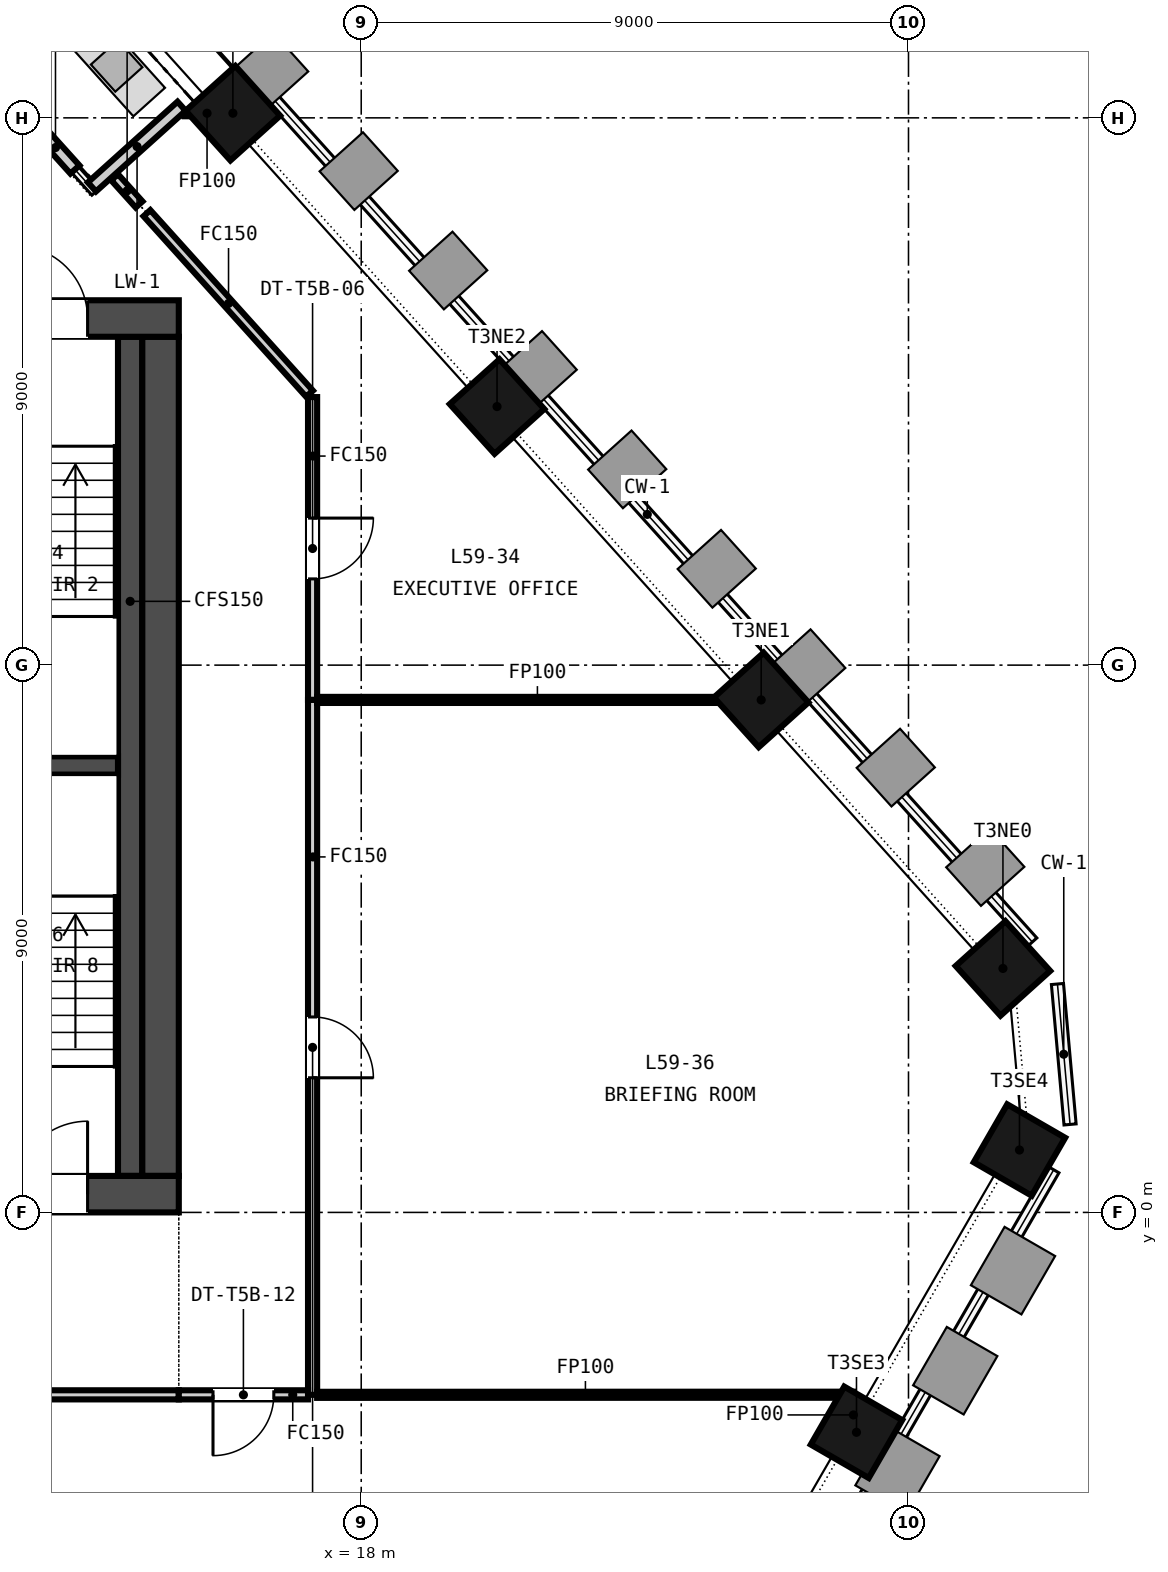
"""IFC4 building model, lengths in metres.
Left out: names, types, materials, properties, quantities, classifications, styles, units other than length and angle.
Written with IfcOpenShell. Run it as: python <this file> out.ifc"""

import sys

from ifc_helpers import new_model, si_unit, direction, frame, frame_2d, origin, origin_2d, place, context, subcontext, project, spatial, rectangle, extrude, element, fill, save


model = new_model("IFC4")
c1 = context("Model", 3, precision=1e-05, world=origin(), true_north=direction((0.0, 1.0)))
c2 = subcontext(c1, "Body", "Model", "MODEL_VIEW")
j1 = project(units=[si_unit("LENGTHUNIT", "METRE"), si_unit("PLANEANGLEUNIT", "RADIAN")], contexts=[c1])
p1 = place(None, origin())
s1 = spatial("IfcSite", under=j1, at=p1, CompositionType="ELEMENT")
p2 = place(p1, origin())
s2 = spatial("IfcBuilding", under=s1, at=p2, CompositionType="ELEMENT")
p3 = place(p2, frame((0.0, 0.0, 234.55)))
s3 = spatial("IfcBuildingStorey", under=s2, at=p3, CompositionType="ELEMENT", Elevation=234.55)
p4 = place(p3, frame((-15.0, 0.3, -0.15), z_axis=(0.0, 0.0, 1.0), x_axis=(1.0, 0.0, 0.0)))
e1 = element("IfcWall", 1, at=p4, inside=s3, PredefinedType="SOLIDWALL", context=c2, shape_type="SweptSolid", body=[
    extrude(rectangle(XDim=30.0, YDim=0.6, at=frame_2d((15.0, 0.0))), origin(), (0.0, 0.0, 1.0), 3.65),
])
p5 = place(p4, frame((5.8, 0.0, 0.15)))
e2 = element("IfcOpeningElement", 2, at=p5, cuts=e1, PredefinedType="OPENING", context=c2, shape_type="SweptSolid", body=[
    extrude(rectangle(XDim=2.4, YDim=2.4, at=frame_2d((1.2, 1.2))), frame((0.0, 0.31, 0.0), z_axis=(0.0, -1.0, 0.0), x_axis=(1.0, 0.0, 0.0)), (0.0, 0.0, 1.0), 0.62),
])
p6 = place(p4, frame((13.8, 0.0, 0.15)))
e3 = element("IfcOpeningElement", 3, at=p6, cuts=e1, PredefinedType="OPENING", context=c2, shape_type="SweptSolid", body=[
    extrude(rectangle(XDim=2.4, YDim=2.4, at=frame_2d((1.2, 1.2))), frame((0.0, 0.31, 0.0), z_axis=(0.0, -1.0, 0.0), x_axis=(1.0, 0.0, 0.0)), (0.0, 0.0, 1.0), 0.62),
])
p7 = place(p4, frame((21.8, 0.0, 0.15)))
e4 = element("IfcOpeningElement", 4, at=p7, cuts=e1, PredefinedType="OPENING", context=c2, shape_type="SweptSolid", body=[
    extrude(rectangle(XDim=2.4, YDim=2.4, at=frame_2d((1.2, 1.2))), frame((0.0, 0.31, 0.0), z_axis=(0.0, -1.0, 0.0), x_axis=(1.0, 0.0, 0.0)), (0.0, 0.0, 1.0), 0.62),
])
p8 = place(p4, frame((1.5, 0.0, 0.15)))
e5 = element("IfcOpeningElement", 5, at=p8, cuts=e1, PredefinedType="OPENING", context=c2, shape_type="SweptSolid", body=[
    extrude(rectangle(XDim=1.2, YDim=2.1, at=frame_2d((0.6, 1.05))), frame((0.0, 0.31, 0.0), z_axis=(0.0, -1.0, 0.0), x_axis=(1.0, 0.0, 0.0)), (0.0, 0.0, 1.0), 0.62),
])
p9 = place(p4, frame((27.3, 0.0, 0.15)))
e6 = element("IfcOpeningElement", 6, at=p9, cuts=e1, PredefinedType="OPENING", context=c2, shape_type="SweptSolid", body=[
    extrude(rectangle(XDim=1.2, YDim=2.1, at=frame_2d((0.6, 1.05))), frame((0.0, 0.31, 0.0), z_axis=(0.0, -1.0, 0.0), x_axis=(1.0, 0.0, 0.0)), (0.0, 0.0, 1.0), 0.62),
])
p10 = place(p3, frame((-15.0, 14.7, -0.15), z_axis=(0.0, 0.0, 1.0), x_axis=(1.0, 0.0, 0.0)))
e7 = element("IfcWall", 7, at=p10, inside=s3, PredefinedType="SOLIDWALL", context=c2, shape_type="SweptSolid", body=[
    extrude(rectangle(XDim=30.0, YDim=0.6, at=frame_2d((15.0, 0.0))), origin(), (0.0, 0.0, 1.0), 3.65),
])
p11 = place(p10, frame((9.25, 0.0, 0.15)))
e8 = element("IfcOpeningElement", 8, at=p11, cuts=e7, PredefinedType="OPENING", context=c2, shape_type="SweptSolid", body=[
    extrude(rectangle(XDim=1.5, YDim=2.1, at=frame_2d((0.75, 1.05))), frame((0.0, 0.31, 0.0), z_axis=(0.0, -1.0, 0.0), x_axis=(1.0, 0.0, 0.0)), (0.0, 0.0, 1.0), 0.62),
])
p12 = place(p10, frame((19.4, 0.0, 0.15)))
e9 = element("IfcOpeningElement", 9, at=p12, cuts=e7, PredefinedType="OPENING", context=c2, shape_type="SweptSolid", body=[
    extrude(rectangle(XDim=1.5, YDim=2.1, at=frame_2d((0.75, 1.05))), frame((0.0, 0.31, 0.0), z_axis=(0.0, -1.0, 0.0), x_axis=(1.0, 0.0, 0.0)), (0.0, 0.0, 1.0), 0.62),
])
p13 = place(p10, frame((1.5, 0.0, 0.15)))
e10 = element("IfcOpeningElement", 10, at=p13, cuts=e7, PredefinedType="OPENING", context=c2, shape_type="SweptSolid", body=[
    extrude(rectangle(XDim=1.2, YDim=2.1, at=frame_2d((0.6, 1.05))), frame((0.0, 0.31, 0.0), z_axis=(0.0, -1.0, 0.0), x_axis=(1.0, 0.0, 0.0)), (0.0, 0.0, 1.0), 0.62),
])
p14 = place(p10, frame((27.3, 0.0, 0.15)))
e11 = element("IfcOpeningElement", 11, at=p14, cuts=e7, PredefinedType="OPENING", context=c2, shape_type="SweptSolid", body=[
    extrude(rectangle(XDim=1.2, YDim=2.1, at=frame_2d((0.6, 1.05))), frame((0.0, 0.31, 0.0), z_axis=(0.0, -1.0, 0.0), x_axis=(1.0, 0.0, 0.0)), (0.0, 0.0, 1.0), 0.62),
])
p15 = place(p3, frame((14.7, 0.6, -0.15), z_axis=(0.0, 0.0, 1.0), x_axis=(0.0, 1.0, 0.0)))
e12 = element("IfcWall", 12, at=p15, inside=s3, PredefinedType="SOLIDWALL", context=c2, shape_type="SweptSolid", body=[
    extrude(rectangle(XDim=13.8, YDim=0.6, at=frame_2d((6.9, 0.0))), origin(), (0.0, 0.0, 1.0), 3.65),
])
for number, where, z_axis, x_axis in (
    (13, (26.145, -3.616, -0.15), (0.0, 0.0, 1.0), (0.5, 0.866, 0.0)),
    (14, (28.825, 1.026, -0.15), (0.0, 0.0, 1.0), (0.5, 0.866, 0.0)),
    (15, (28.553, 4.012, -0.15), (0.0, 0.0, 1.0), (-0.669, 0.743, 0.0)),
    (16, (24.577, 8.427, -0.15), (0.0, 0.0, 1.0), (-0.669, 0.743, 0.0)),
    (17, (20.233, 13.252, -0.15), (0.0, 0.0, 1.0), (-0.669, 0.743, 0.0)),
    (18, (15.89, 18.076, -0.15), (0.0, 0.0, 1.0), (-0.669, 0.743, 0.0)),
):
    element("IfcColumn", number, at=place(p3, frame(where, z_axis=z_axis, x_axis=x_axis)), inside=s3, PredefinedType="COLUMN", context=c2, shape_type="SweptSolid", body=[
        extrude(rectangle(XDim=1.1, YDim=1.1, at=origin_2d()), origin(), (0.0, 0.0, 1.0), 3.65),
    ])
p16 = place(p3, frame((13.292, 17.15, 0.0), z_axis=(0.0, 0.0, 1.0), x_axis=(-0.66915429884, 0.743123491988, 0.0)))
e19 = element("IfcWall", 19, at=p16, inside=s3, PredefinedType="SOLIDWALL", context=c2, shape_type="SweptSolid", body=[
    extrude(rectangle(XDim=3.842, YDim=0.2, at=frame_2d((1.921, 0.0))), origin(), (0.0, 0.0, 1.0), 3.05),
])
p17 = place(p16, frame((1.021, 0.0, 0.0)))
e20 = element("IfcOpeningElement", 20, at=p17, cuts=e19, PredefinedType="OPENING", context=c2, shape_type="SweptSolid", body=[
    extrude(rectangle(XDim=1.8, YDim=2.4, at=frame_2d((0.9, 1.2))), frame((0.0, 0.11, 0.0), z_axis=(0.0, -1.0, 0.0), x_axis=(1.0, 0.0, 0.0)), (0.0, 0.0, 1.0), 0.22),
])
p18 = place(p3, frame((15.046, 18.191, 0.0), z_axis=(0.0, 0.0, 1.0), x_axis=(-0.743116679126, -0.669161864727, 0.0)))
e21 = element("IfcWall", 21, at=p18, inside=s3, PredefinedType="SOLIDWALL", context=c2, shape_type="SweptSolid", body=[
    extrude(rectangle(XDim=1.984, YDim=0.2, at=frame_2d((0.992, 0.0))), origin(), (0.0, 0.0, 1.0), 3.05),
])
p19 = place(p3, frame((11.05, 7.35, 0.0), z_axis=(0.0, 0.0, 1.0), x_axis=(1.0, 0.0, 0.0)))
e22 = element("IfcWall", 22, at=p19, inside=s3, PredefinedType="SOLIDWALL", context=c2, shape_type="SweptSolid", body=[
    extrude(rectangle(XDim=2.95, YDim=0.3, at=frame_2d((1.475, 0.0))), origin(), (0.0, 0.0, 1.0), 3.5),
])
p20 = place(p3, frame((14.2, 0.6, 0.0), z_axis=(0.0, 0.0, 1.0), x_axis=(0.0, 1.0, 0.0)))
e23 = element("IfcWall", 23, at=p20, inside=s3, PredefinedType="SOLIDWALL", context=c2, shape_type="SweptSolid", body=[
    extrude(rectangle(XDim=13.8, YDim=0.4, at=frame_2d((6.9, 0.0))), origin(), (0.0, 0.0, 1.0), 3.5),
])
p21 = place(p3, frame((15.0, -3.0, 0.0), z_axis=(0.0, 0.0, 1.0), x_axis=(-1.0, 0.0, 0.0)))
e24 = element("IfcWall", 24, at=p21, inside=s3, PredefinedType="PARTITIONING", context=c2, shape_type="SweptSolid", body=[
    extrude(rectangle(XDim=27.904, YDim=0.15, at=frame_2d((13.952, 0.0))), origin(), (0.0, 0.0, 1.0), 2.751),
])
p22 = place(p21, frame((13.052, 0.0, 0.0)))
e25 = element("IfcOpeningElement", 25, at=p22, cuts=e24, PredefinedType="OPENING", context=c2, shape_type="SweptSolid", body=[
    extrude(rectangle(XDim=1.8, YDim=2.1, at=frame_2d((0.9, 1.05))), frame((0.0, 0.085, 0.0), z_axis=(0.0, -1.0, 0.0), x_axis=(1.0, 0.0, 0.0)), (0.0, 0.0, 1.0), 0.17),
])
p23 = place(p3, frame((17.2, 13.408, 0.0), z_axis=(0.0, 0.0, 1.0), x_axis=(0.0, -1.0, 0.0)))
e26 = element("IfcWall", 26, at=p23, inside=s3, PredefinedType="PARTITIONING", context=c2, shape_type="SweptSolid", body=[
    extrude(rectangle(XDim=4.98, YDim=0.15, at=frame_2d((2.49, 0.0))), origin(), (0.0, 0.0, 1.0), 2.751),
])
p24 = place(p23, frame((1.99, 0.0, 0.0)))
e27 = element("IfcOpeningElement", 27, at=p24, cuts=e26, PredefinedType="OPENING", context=c2, shape_type="SweptSolid", body=[
    extrude(rectangle(XDim=1.0, YDim=2.1, at=frame_2d((0.5, 1.05))), frame((0.0, 0.085, 0.0), z_axis=(0.0, -1.0, 0.0), x_axis=(1.0, 0.0, 0.0)), (0.0, 0.0, 1.0), 0.17),
])
p25 = place(p3, frame((17.2, 8.428, 0.0), z_axis=(0.0, 0.0, 1.0), x_axis=(0.0, -1.0, 0.0)))
e28 = element("IfcWall", 28, at=p25, inside=s3, PredefinedType="PARTITIONING", context=c2, shape_type="SweptSolid", body=[
    extrude(rectangle(XDim=11.428, YDim=0.15, at=frame_2d((5.714, 0.0))), origin(), (0.0, 0.0, 1.0), 2.751),
])
p26 = place(p25, frame((5.214, 0.0, 0.0)))
e29 = element("IfcOpeningElement", 29, at=p26, cuts=e28, PredefinedType="OPENING", context=c2, shape_type="SweptSolid", body=[
    extrude(rectangle(XDim=1.0, YDim=2.1, at=frame_2d((0.5, 1.05))), frame((0.0, 0.085, 0.0), z_axis=(0.0, -1.0, 0.0), x_axis=(1.0, 0.0, 0.0)), (0.0, 0.0, 1.0), 0.17),
])
p27 = place(p3, frame((17.125, -3.0, 0.0), z_axis=(0.0, 0.0, 1.0), x_axis=(-1.0, 0.0, 0.0)))
e30 = element("IfcWall", 30, at=p27, inside=s3, PredefinedType="PARTITIONING", context=c2, shape_type="SweptSolid", body=[
    extrude(rectangle(XDim=2.125, YDim=0.15, at=frame_2d((1.062, 0.0))), origin(), (0.0, 0.0, 1.0), 2.751),
])
p28 = place(p27, frame((0.562, 0.0, 0.0)))
e31 = element("IfcOpeningElement", 31, at=p28, cuts=e30, PredefinedType="OPENING", context=c2, shape_type="SweptSolid", body=[
    extrude(rectangle(XDim=1.0, YDim=2.1, at=frame_2d((0.5, 1.05))), frame((0.0, 0.085, 0.0), z_axis=(0.0, -1.0, 0.0), x_axis=(1.0, 0.0, 0.0)), (0.0, 0.0, 1.0), 0.17),
])
p29 = place(p3, frame((15.097, 18.076, 0.0), z_axis=(0.0, 0.0, 1.0), x_axis=(1.0, 0.0, 0.0)))
e32 = element("IfcWall", 32, at=p29, inside=s3, PredefinedType="PARTITIONING", context=c2, shape_type="SweptSolid", body=[
    extrude(rectangle(XDim=0.725, YDim=0.1, at=frame_2d((0.362, 0.0))), origin(), (0.0, 0.0, 1.0), 2.751),
])
p30 = place(p3, frame((13.944, 17.024, 0.0), z_axis=(0.0, 0.0, 1.0), x_axis=(0.669076605274, -0.74319344472, 0.0)))
e33 = element("IfcWall", 33, at=p30, inside=s3, PredefinedType="PARTITIONING", context=c2, shape_type="SweptSolid", body=[
    extrude(rectangle(XDim=0.603, YDim=0.15, at=frame_2d((0.301, 0.0))), origin(), (0.0, 0.0, 1.0), 2.751),
])
p31 = place(p3, frame((14.476, 16.433, 0.0), z_axis=(0.0, 0.0, 1.0), x_axis=(0.669204384193, -0.743078388985, 0.0)))
e34 = element("IfcWall", 34, at=p31, inside=s3, PredefinedType="PARTITIONING", context=c2, shape_type="SweptSolid", body=[
    extrude(rectangle(XDim=3.996, YDim=0.15, at=frame_2d((1.998, 0.0))), origin(), (0.0, 0.0, 1.0), 2.751),
])
p32 = place(p3, frame((17.275, 8.428, 0.0), z_axis=(0.0, 0.0, 1.0), x_axis=(1.0, 0.0, 0.0)))
e35 = element("IfcWall", 35, at=p32, inside=s3, PredefinedType="PARTITIONING", context=c2, shape_type="SweptSolid", body=[
    extrude(rectangle(XDim=7.235, YDim=0.1, at=frame_2d((3.618, 0.0))), origin(), (0.0, 0.0, 1.0), 2.751),
])
p33 = place(p3, frame((17.275, -3.0, 0.0), z_axis=(0.0, 0.0, 1.0), x_axis=(0.999999975449, 0.000221588228, 0.0)))
e36 = element("IfcWall", 36, at=p33, inside=s3, PredefinedType="PARTITIONING", context=c2, shape_type="SweptSolid", body=[
    extrude(rectangle(XDim=8.814, YDim=0.1, at=frame_2d((4.407, 0.0))), origin(), (0.0, 0.0, 1.0), 2.751),
])
p34 = place(p3, frame((26.089, -3.613, 0.0), z_axis=(0.0, 0.0, 1.0), x_axis=(0.0, 1.0, 0.0)))
e37 = element("IfcWall", 37, at=p34, inside=s3, PredefinedType="PARTITIONING", context=c2, shape_type="SweptSolid", body=[
    extrude(rectangle(XDim=0.565, YDim=0.1, at=frame_2d((0.282, 0.0))), origin(), (0.0, 0.0, 1.0), 2.751),
])
p35 = place(p14, origin())
e38 = element("IfcDoor", 38, at=p35, inside=s3, OperationType="SINGLE_SWING_LEFT", PredefinedType="DOOR", context=c2, shape_type="SweptSolid", body=[
    extrude(rectangle(XDim=1.2, YDim=2.1, at=frame_2d((0.6, 1.05))), frame((0.0, 0.025, 0.0), z_axis=(0.0, -1.0, 0.0), x_axis=(1.0, 0.0, 0.0)), (0.0, 0.0, 1.0), 0.05),
])
fill(e11, e38)
p36 = place(p9, origin())
e39 = element("IfcDoor", 39, at=p36, inside=s3, OperationType="SINGLE_SWING_RIGHT", PredefinedType="DOOR", context=c2, shape_type="SweptSolid", body=[
    extrude(rectangle(XDim=1.2, YDim=2.1, at=frame_2d((0.6, 1.05))), frame((0.0, 0.025, 0.0), z_axis=(0.0, -1.0, 0.0), x_axis=(1.0, 0.0, 0.0)), (0.0, 0.0, 1.0), 0.05),
])
fill(e6, e39)
p37 = place(p24, origin())
e40 = element("IfcDoor", 40, at=p37, inside=s3, OperationType="SINGLE_SWING_LEFT", PredefinedType="DOOR", context=c2, shape_type="SweptSolid", body=[
    extrude(rectangle(XDim=1.0, YDim=2.1, at=frame_2d((0.5, 1.05))), frame((0.0, 0.025, 0.0), z_axis=(0.0, -1.0, 0.0), x_axis=(1.0, 0.0, 0.0)), (0.0, 0.0, 1.0), 0.05),
])
fill(e27, e40)
p38 = place(p26, origin())
e41 = element("IfcDoor", 41, at=p38, inside=s3, OperationType="SINGLE_SWING_RIGHT", PredefinedType="DOOR", context=c2, shape_type="SweptSolid", body=[
    extrude(rectangle(XDim=1.0, YDim=2.1, at=frame_2d((0.5, 1.05))), frame((0.0, 0.025, 0.0), z_axis=(0.0, -1.0, 0.0), x_axis=(1.0, 0.0, 0.0)), (0.0, 0.0, 1.0), 0.05),
])
fill(e29, e41)
p39 = place(p28, origin())
e42 = element("IfcDoor", 42, at=p39, inside=s3, OperationType="SINGLE_SWING_RIGHT", PredefinedType="DOOR", context=c2, shape_type="SweptSolid", body=[
    extrude(rectangle(XDim=1.0, YDim=2.1, at=frame_2d((0.5, 1.05))), frame((0.0, 0.025, 0.0), z_axis=(0.0, -1.0, 0.0), x_axis=(1.0, 0.0, 0.0)), (0.0, 0.0, 1.0), 0.05),
])
fill(e31, e42)
save(model, sys.argv[1])
